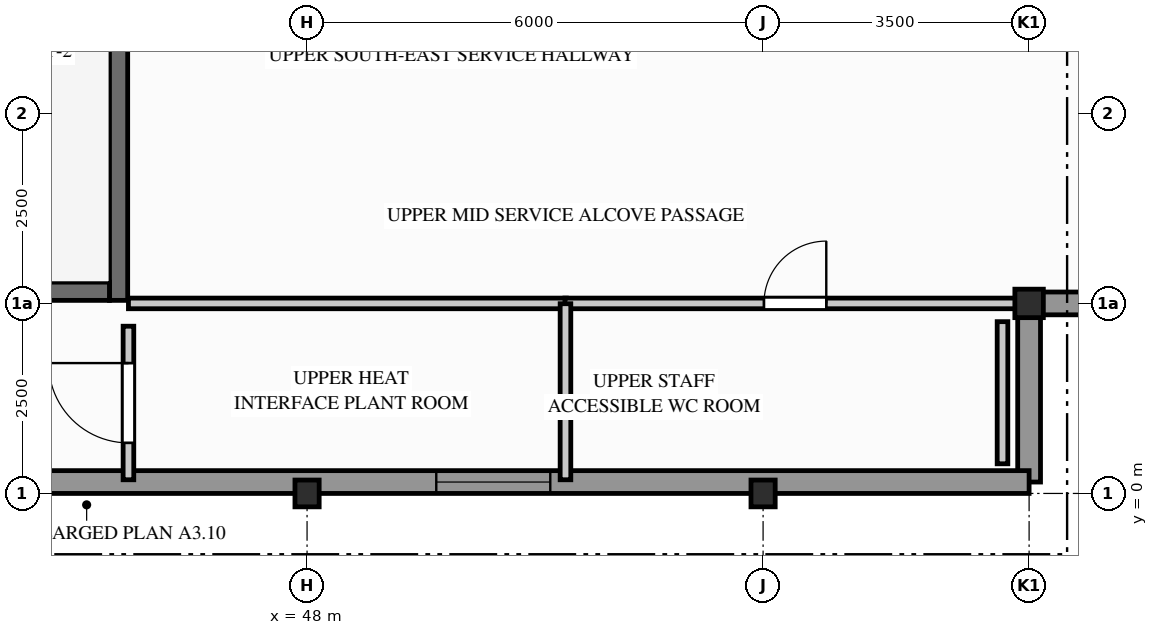
"""IFC4 building model, lengths in metres.
Left out: names, types, materials, properties, quantities, classifications, styles, units other than length and angle.
Written with IfcOpenShell. Run it as: python <this file> out.ifc"""

import sys

from ifc_helpers import new_model, si_unit, direction, frame, frame_2d, origin, origin_2d, place, context, subcontext, project, spatial, rectangle, i_section, extrude, element, fill, save


model = new_model("IFC4")
c1 = context("Model", 3, precision=1e-05, world=origin(), true_north=direction((0.0, 1.0)))
c2 = subcontext(c1, "Body", "Model", "MODEL_VIEW")
j1 = project(units=[si_unit("LENGTHUNIT", "METRE"), si_unit("PLANEANGLEUNIT", "RADIAN")], contexts=[c1])
p1 = place(None, origin())
s1 = spatial("IfcSite", under=j1, at=p1, CompositionType="ELEMENT")
p2 = place(p1, origin())
s2 = spatial("IfcBuilding", under=s1, at=p2, CompositionType="ELEMENT")
p3 = place(p2, frame((0.0, 0.0, 230.4)))
s3 = spatial("IfcBuildingStorey", under=s2, at=p3, CompositionType="ELEMENT", Elevation=230.4)
for number, where, z_axis, x_axis in (
    (1, (48.0, 0.0, 0.0), (0.0, 0.0, 1.0), (1.0, 0.0, 0.0)),
    (2, (54.0, 0.0, 0.0), (0.0, 0.0, 1.0), (1.0, 0.0, 0.0)),
):
    element("IfcColumn", number, at=place(p3, frame(where, z_axis=z_axis, x_axis=x_axis)), inside=s3, PredefinedType="COLUMN", context=c2, shape_type="SweptSolid", body=[
        extrude(i_section(OverallWidth=0.318, OverallDepth=0.353, WebThickness=0.023, FlangeThickness=0.038, FilletRadius=0.015, at=origin_2d()), origin(), (0.0, 0.0, 1.0), 3.1),
    ])
p4 = place(p3, frame((57.5, 2.5, 0.0), z_axis=(0.0, 0.0, 1.0), x_axis=(1.0, 0.0, 0.0)))
e3 = element("IfcColumn", 3, at=p4, inside=s3, PredefinedType="COLUMN", context=c2, shape_type="SweptSolid", body=[
    extrude(i_section(OverallWidth=0.375, OverallDepth=0.375, WebThickness=0.017, FlangeThickness=0.027, FilletRadius=0.015, at=origin_2d()), origin(), (0.0, 0.0, 1.0), 3.1),
])
for number, where, z_axis, x_axis in (
    (4, (57.5, 0.15, 0.0), (0.0, 0.0, 1.0), (0.0, 1.0, 0.0)),
    (5, (57.5, 2.5, 0.0), (0.0, 0.0, 1.0), (1.0, 0.0, 0.0)),
):
    element("IfcWall", number, at=place(p3, frame(where, z_axis=z_axis, x_axis=x_axis)), inside=s3, PredefinedType="STANDARD", context=c2, shape_type="SweptSolid", body=[
        extrude(rectangle(XDim=2.35, YDim=0.3, at=frame_2d((1.175, 0.0))), origin(), (0.0, 0.0, 1.0), 2.89),
    ])
p5 = place(p3, frame((29.75, 0.15, 0.0), z_axis=(0.0, 0.0, 1.0), x_axis=(1.0, 0.0, 0.0)))
e6 = element("IfcWall", 6, at=p5, inside=s3, PredefinedType="STANDARD", context=c2, shape_type="SweptSolid", body=[
    extrude(rectangle(XDim=27.75, YDim=0.3, at=frame_2d((13.875, 0.0))), origin(), (0.0, 0.0, 1.0), 2.332),
])
p6 = place(p5, frame((2.5, 0.0, 0.712)))
e7 = element("IfcOpeningElement", 7, at=p6, cuts=e6, PredefinedType="OPENING", context=c2, shape_type="SweptSolid", body=[
    extrude(rectangle(XDim=0.8, YDim=1.4, at=frame_2d((0.4, 0.7))), frame((0.0, 0.16, 0.0), z_axis=(0.0, -1.0, 0.0), x_axis=(1.0, 0.0, 0.0)), (0.0, 0.0, 1.0), 0.32),
])
p7 = place(p5, frame((19.95, 0.0, 0.312)))
e8 = element("IfcOpeningElement", 8, at=p7, cuts=e6, PredefinedType="OPENING", context=c2, shape_type="SweptSolid", body=[
    extrude(rectangle(XDim=1.5, YDim=1.8, at=frame_2d((0.75, 0.9))), frame((0.0, 0.16, 0.0), z_axis=(0.0, -1.0, 0.0), x_axis=(1.0, 0.0, 0.0)), (0.0, 0.0, 1.0), 0.32),
])
p8 = place(p3, frame((45.52, 2.54, 0.0), z_axis=(0.0, 0.0, 1.0), x_axis=(0.0, 1.0, 0.0)))
e9 = element("IfcWall", 9, at=p8, inside=s3, PredefinedType="SHEAR", context=c2, shape_type="SweptSolid", body=[
    extrude(rectangle(XDim=7.2, YDim=0.24, at=frame_2d((3.6, 0.0))), origin(), (0.0, 0.0, 1.0), 2.89),
])
p9 = place(p3, frame((42.45, 2.66, 0.0), z_axis=(0.0, 0.0, 1.0), x_axis=(1.0, 0.0, 0.0)))
e10 = element("IfcWall", 10, at=p9, inside=s3, PredefinedType="SHEAR", context=c2, shape_type="SweptSolid", body=[
    extrude(rectangle(XDim=2.95, YDim=0.24, at=frame_2d((1.475, 0.0))), origin(), (0.0, 0.0, 1.0), 2.89),
])
p10 = place(p3, frame((45.65, 0.18, 0.0), z_axis=(0.0, 0.0, 1.0), x_axis=(0.0, 1.0, 0.0)))
e11 = element("IfcWall", 11, at=p10, inside=s3, PredefinedType="PARTITIONING", context=c2, shape_type="SweptSolid", body=[
    extrude(rectangle(XDim=2.02, YDim=0.14, at=frame_2d((1.01, 0.0))), origin(), (0.0, 0.0, 1.0), 2.89),
])
p11 = place(p10, frame((0.485, 0.0, 0.0)))
e12 = element("IfcOpeningElement", 12, at=p11, cuts=e11, PredefinedType="OPENING", context=c2, shape_type="SweptSolid", body=[
    extrude(rectangle(XDim=1.05, YDim=2.06, at=frame_2d((0.525, 1.03))), frame((0.0, 0.08, 0.0), z_axis=(0.0, -1.0, 0.0), x_axis=(1.0, 0.0, 0.0)), (0.0, 0.0, 1.0), 0.16),
])
p12 = place(p3, frame((45.65, 2.5, 0.0), z_axis=(0.0, 0.0, 1.0), x_axis=(1.0, 0.0, 0.0)))
e13 = element("IfcWall", 13, at=p12, inside=s3, PredefinedType="PARTITIONING", context=c2, shape_type="SweptSolid", body=[
    extrude(rectangle(XDim=5.761, YDim=0.14, at=frame_2d((2.881, 0.0))), origin(), (0.0, 0.0, 1.0), 2.326),
])
p13 = place(p3, frame((51.393, 2.5, 0.0), z_axis=(0.0, 0.0, 1.0), x_axis=(1.0, 0.0, 0.0)))
e14 = element("IfcWall", 14, at=p13, inside=s3, PredefinedType="PARTITIONING", context=c2, shape_type="SweptSolid", body=[
    extrude(rectangle(XDim=6.057, YDim=0.14, at=frame_2d((3.029, 0.0))), origin(), (0.0, 0.0, 1.0), 2.326),
])
p14 = place(p13, frame((2.619, 0.0, 0.0)))
e15 = element("IfcOpeningElement", 15, at=p14, cuts=e14, PredefinedType="OPENING", context=c2, shape_type="SweptSolid", body=[
    extrude(rectangle(XDim=0.82, YDim=2.02, at=frame_2d((0.41, 1.01))), frame((0.0, 0.08, 0.0), z_axis=(0.0, -1.0, 0.0), x_axis=(1.0, 0.0, 0.0)), (0.0, 0.0, 1.0), 0.16),
])
p15 = place(p3, frame((51.4, 0.18, 0.0), z_axis=(0.0, 0.0, 1.0), x_axis=(0.0, 1.0, 0.0)))
e16 = element("IfcWall", 16, at=p15, inside=s3, PredefinedType="PARTITIONING", context=c2, shape_type="SweptSolid", body=[
    extrude(rectangle(XDim=2.316, YDim=0.14, at=frame_2d((1.158, 0.0))), origin(), (0.0, 0.0, 1.0), 2.89),
])
p16 = place(p3, frame((57.15, 0.39, 0.0), z_axis=(0.0, 0.0, 1.0), x_axis=(0.0, 1.0, 0.0)))
e17 = element("IfcWall", 17, at=p16, inside=s3, PredefinedType="PARTITIONING", context=c2, shape_type="SweptSolid", body=[
    extrude(rectangle(XDim=1.87, YDim=0.14, at=frame_2d((0.935, 0.0))), origin(), (0.0, 0.0, 1.0), 2.89),
])
p17 = place(p7, origin())
e18 = element("IfcWindow", 18, at=p17, inside=s3, PartitioningType="SINGLE_PANEL", PredefinedType="WINDOW", context=c2, shape_type="SweptSolid", body=[
    extrude(rectangle(XDim=1.5, YDim=1.8, at=frame_2d((0.75, 0.9))), frame((0.0, 0.03, 0.0), z_axis=(0.0, -1.0, 0.0), x_axis=(1.0, 0.0, 0.0)), (0.0, 0.0, 1.0), 0.06),
])
fill(e8, e18)
p18 = place(p11, origin())
e19 = element("IfcDoor", 19, at=p18, inside=s3, OperationType="SINGLE_SWING_RIGHT", PredefinedType="DOOR", context=c2, shape_type="SweptSolid", body=[
    extrude(rectangle(XDim=1.05, YDim=2.06, at=frame_2d((0.525, 1.03))), frame((0.0, 0.025, 0.0), z_axis=(0.0, -1.0, 0.0), x_axis=(1.0, 0.0, 0.0)), (0.0, 0.0, 1.0), 0.05),
])
fill(e12, e19)
p19 = place(p14, origin())
e20 = element("IfcDoor", 20, at=p19, inside=s3, OperationType="SINGLE_SWING_RIGHT", PredefinedType="DOOR", context=c2, shape_type="SweptSolid", body=[
    extrude(rectangle(XDim=0.82, YDim=2.02, at=frame_2d((0.41, 1.01))), frame((0.0, 0.025, 0.0), z_axis=(0.0, -1.0, 0.0), x_axis=(1.0, 0.0, 0.0)), (0.0, 0.0, 1.0), 0.05),
])
fill(e15, e20)
save(model, sys.argv[1])
